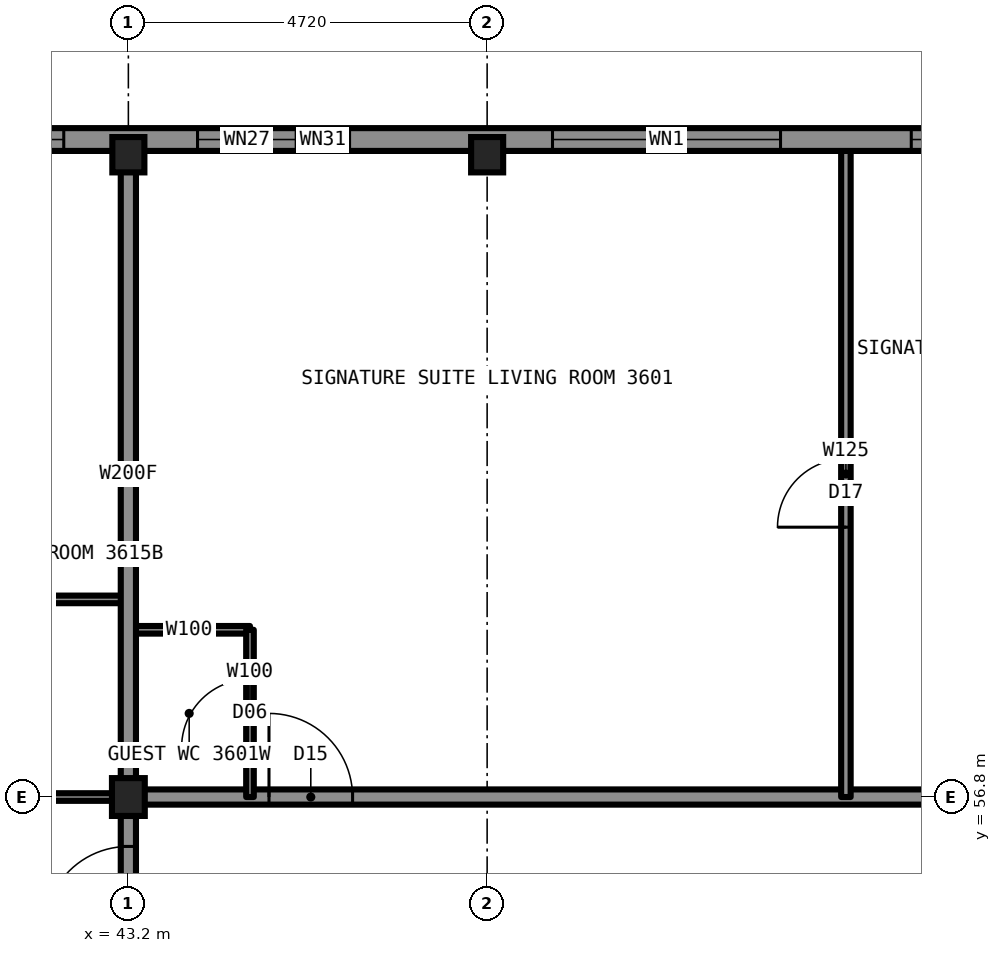
"""IFC4 building model, lengths in metres.
Left out: names, types, materials, properties, quantities, classifications, styles, units other than length and angle.
Written with IfcOpenShell. Run it as: python <this file> out.ifc"""

import sys

from ifc_helpers import new_model, si_unit, direction, frame, frame_2d, origin, origin_2d, place, context, subcontext, project, spatial, rectangle, i_section, extrude, element, fill, save


model = new_model("IFC4")
c1 = context("Model", 3, precision=1e-05, world=origin(), true_north=direction((0.0, 1.0)))
c2 = subcontext(c1, "Body", "Model", "MODEL_VIEW")
j1 = project(units=[si_unit("LENGTHUNIT", "METRE"), si_unit("PLANEANGLEUNIT", "RADIAN")], contexts=[c1])
p1 = place(None, origin())
s1 = spatial("IfcSite", under=j1, at=p1, CompositionType="ELEMENT")
p2 = place(p1, origin())
s2 = spatial("IfcBuilding", under=s1, at=p2, CompositionType="ELEMENT")
p3 = place(p2, frame((0.0, 0.0, 135.4)))
s3 = spatial("IfcBuildingStorey", under=s2, at=p3, CompositionType="ELEMENT", Elevation=135.4)
for number, where, z_axis, x_axis in (
    (1, (43.2, 65.25, 0.0), (0.0, 0.0, 1.0), (1.0, 0.0, 0.0)),
    (2, (47.92, 65.25, 0.0), (0.0, 0.0, 1.0), (1.0, 0.0, 0.0)),
):
    element("IfcColumn", number, at=place(p3, frame(where, z_axis=z_axis, x_axis=x_axis)), inside=s3, PredefinedType="COLUMN", context=c2, shape_type="SweptSolid", body=[
        extrude(i_section(OverallWidth=0.422, OverallDepth=0.465, WebThickness=0.045, FlangeThickness=0.073, at=origin_2d()), origin(), (0.0, 0.0, 1.0), 3.5),
    ])
p4 = place(p3, frame((43.2, 56.8, 0.0), z_axis=(0.0, 0.0, 1.0), x_axis=(1.0, 0.0, 0.0)))
e3 = element("IfcColumn", 3, at=p4, inside=s3, PredefinedType="COLUMN", context=c2, shape_type="SweptSolid", body=[
    extrude(i_section(OverallWidth=0.432, OverallDepth=0.498, WebThickness=0.056, FlangeThickness=0.089, at=origin_2d()), origin(), (0.0, 0.0, 1.0), 3.5),
])
p5 = place(p3, frame((40.6, 56.8, 0.0), z_axis=(0.0, 0.0, 1.0), x_axis=(1.0, 0.0, 0.0)))
e4 = element("IfcWall", 4, at=p5, inside=s3, PredefinedType="PARTITIONING", context=c2, shape_type="SweptSolid", body=[
    extrude(rectangle(XDim=2.6, YDim=0.1, at=frame_2d((1.3, 0.0))), origin(), (0.0, 0.0, 1.0), 2.573),
])
p6 = place(p3, frame((43.2, 56.8, 0.0), z_axis=(0.0, 0.0, 1.0), x_axis=(1.0, 0.0, 0.0)))
e5 = element("IfcWall", 5, at=p6, inside=s3, PredefinedType="PARTITIONING", context=c2, shape_type="SweptSolid", body=[
    extrude(rectangle(XDim=23.6, YDim=0.2, at=frame_2d((11.8, 0.0))), origin(), (0.0, 0.0, 1.0), 3.33),
])
p7 = place(p6, frame((1.85, 0.0, 0.0)))
e6 = element("IfcOpeningElement", 6, at=p7, cuts=e5, PredefinedType="OPENING", context=c2, shape_type="SweptSolid", body=[
    extrude(rectangle(XDim=1.1, YDim=2.2, at=frame_2d((0.55, 1.1))), frame((0.0, 0.11, 0.0), z_axis=(0.0, -1.0, 0.0), x_axis=(1.0, 0.0, 0.0)), (0.0, 0.0, 1.0), 0.22),
])
p8 = place(p6, frame((14.56, 0.0, 0.0)))
e7 = element("IfcOpeningElement", 7, at=p8, cuts=e5, PredefinedType="OPENING", context=c2, shape_type="SweptSolid", body=[
    extrude(rectangle(XDim=1.0, YDim=2.2, at=frame_2d((0.5, 1.1))), frame((0.0, 0.11, 0.0), z_axis=(0.0, -1.0, 0.0), x_axis=(1.0, 0.0, 0.0)), (0.0, 0.0, 1.0), 0.22),
])
p9 = place(p6, frame((21.14, 0.0, 0.0)))
e8 = element("IfcOpeningElement", 8, at=p9, cuts=e5, PredefinedType="OPENING", context=c2, shape_type="SweptSolid", body=[
    extrude(rectangle(XDim=1.0, YDim=2.2, at=frame_2d((0.5, 1.1))), frame((0.0, 0.11, 0.0), z_axis=(0.0, -1.0, 0.0), x_axis=(1.0, 0.0, 0.0)), (0.0, 0.0, 1.0), 0.22),
])
p10 = place(p3, frame((43.2, 59.0, 0.0), z_axis=(0.0, 0.0, 1.0), x_axis=(1.0, 0.0, 0.0)))
e9 = element("IfcWall", 9, at=p10, inside=s3, PredefinedType="PARTITIONING", context=c2, shape_type="SweptSolid", body=[
    extrude(rectangle(XDim=1.6, YDim=0.1, at=frame_2d((0.8, 0.0))), origin(), (0.0, 0.0, 1.0), 3.33),
])
p11 = place(p3, frame((40.6, 59.4, 0.0), z_axis=(0.0, 0.0, 1.0), x_axis=(1.0, 0.0, 0.0)))
e10 = element("IfcWall", 10, at=p11, inside=s3, PredefinedType="PARTITIONING", context=c2, shape_type="SweptSolid", body=[
    extrude(rectangle(XDim=2.6, YDim=0.1, at=frame_2d((1.3, 0.0))), origin(), (0.0, 0.0, 1.0), 3.33),
])
p12 = place(p3, frame((44.8, 56.8, 0.0), z_axis=(0.0, 0.0, 1.0), x_axis=(0.0, 1.0, 0.0)))
e11 = element("IfcWall", 11, at=p12, inside=s3, PredefinedType="PARTITIONING", context=c2, shape_type="SweptSolid", body=[
    extrude(rectangle(XDim=2.2, YDim=0.1, at=frame_2d((1.1, 0.0))), origin(), (0.0, 0.0, 1.0), 3.33),
])
p13 = place(p12, frame((0.65, 0.0, 0.0)))
e12 = element("IfcOpeningElement", 12, at=p13, cuts=e11, PredefinedType="OPENING", context=c2, shape_type="SweptSolid", body=[
    extrude(rectangle(XDim=0.9, YDim=2.1, at=frame_2d((0.45, 1.05))), frame((0.0, 0.06, 0.0), z_axis=(0.0, -1.0, 0.0), x_axis=(1.0, 0.0, 0.0)), (0.0, 0.0, 1.0), 0.12),
])
p14 = place(p3, frame((43.2, 33.2, 0.0), z_axis=(0.0, 0.0, 1.0), x_axis=(0.0, 1.0, 0.0)))
e13 = element("IfcWall", 13, at=p14, inside=s3, PredefinedType="PARTITIONING", context=c2, shape_type="SweptSolid", body=[
    extrude(rectangle(XDim=23.6, YDim=0.2, at=frame_2d((11.8, 0.0))), origin(), (0.0, 0.0, 1.0), 3.33),
])
p15 = place(p14, frame((6.98, 0.0, 0.0)))
e14 = element("IfcOpeningElement", 14, at=p15, cuts=e13, PredefinedType="OPENING", context=c2, shape_type="SweptSolid", body=[
    extrude(rectangle(XDim=1.0, YDim=2.2, at=frame_2d((0.5, 1.1))), frame((0.0, 0.11, 0.0), z_axis=(0.0, -1.0, 0.0), x_axis=(1.0, 0.0, 0.0)), (0.0, 0.0, 1.0), 0.22),
])
p16 = place(p14, frame((11.7, 0.0, 0.0)))
e15 = element("IfcOpeningElement", 15, at=p16, cuts=e13, PredefinedType="OPENING", context=c2, shape_type="SweptSolid", body=[
    extrude(rectangle(XDim=1.0, YDim=2.2, at=frame_2d((0.5, 1.1))), frame((0.0, 0.11, 0.0), z_axis=(0.0, -1.0, 0.0), x_axis=(1.0, 0.0, 0.0)), (0.0, 0.0, 1.0), 0.22),
])
p17 = place(p14, frame((15.62, 0.0, 0.0)))
e16 = element("IfcOpeningElement", 16, at=p17, cuts=e13, PredefinedType="OPENING", context=c2, shape_type="SweptSolid", body=[
    extrude(rectangle(XDim=1.0, YDim=2.2, at=frame_2d((0.5, 1.1))), frame((0.0, 0.11, 0.0), z_axis=(0.0, -1.0, 0.0), x_axis=(1.0, 0.0, 0.0)), (0.0, 0.0, 1.0), 0.22),
])
p18 = place(p14, frame((21.85, 0.0, 0.0)))
e17 = element("IfcOpeningElement", 17, at=p18, cuts=e13, PredefinedType="OPENING", context=c2, shape_type="SweptSolid", body=[
    extrude(rectangle(XDim=1.1, YDim=2.2, at=frame_2d((0.55, 1.1))), frame((0.0, 0.11, 0.0), z_axis=(0.0, -1.0, 0.0), x_axis=(1.0, 0.0, 0.0)), (0.0, 0.0, 1.0), 0.22),
])
p19 = place(p14, frame((0.65, 0.0, 0.0)))
e18 = element("IfcOpeningElement", 18, at=p19, cuts=e13, PredefinedType="OPENING", context=c2, shape_type="SweptSolid", body=[
    extrude(rectangle(XDim=1.1, YDim=2.2, at=frame_2d((0.55, 1.1))), frame((0.0, 0.11, 0.0), z_axis=(0.0, -1.0, 0.0), x_axis=(1.0, 0.0, 0.0)), (0.0, 0.0, 1.0), 0.22),
])
p20 = place(p3, frame((43.2, 56.8, 0.0), z_axis=(0.0, 0.0, 1.0), x_axis=(0.0, 1.0, 0.0)))
e19 = element("IfcWall", 19, at=p20, inside=s3, PredefinedType="PARTITIONING", context=c2, shape_type="SweptSolid", body=[
    extrude(rectangle(XDim=8.5, YDim=0.2, at=frame_2d((4.25, 0.0))), origin(), (0.0, 0.0, 1.0), 2.573),
])
p21 = place(p3, frame((52.64, 56.8, 0.0), z_axis=(0.0, 0.0, 1.0), x_axis=(0.0, 1.0, 0.0)))
e20 = element("IfcWall", 20, at=p21, inside=s3, PredefinedType="PARTITIONING", context=c2, shape_type="SweptSolid", body=[
    extrude(rectangle(XDim=8.5, YDim=0.125, at=frame_2d((4.25, 0.0))), origin(), (0.0, 0.0, 1.0), 3.33),
])
p22 = place(p21, frame((3.55, 0.0, 0.0)))
e21 = element("IfcOpeningElement", 21, at=p22, cuts=e20, PredefinedType="OPENING", context=c2, shape_type="SweptSolid", body=[
    extrude(rectangle(XDim=0.9, YDim=2.2, at=frame_2d((0.45, 1.1))), frame((0.0, 0.073, 0.0), z_axis=(0.0, -1.0, 0.0), x_axis=(1.0, 0.0, 0.0)), (0.0, 0.0, 1.0), 0.145),
])
p23 = place(p3, frame((70.1, 65.45, 0.0), z_axis=(0.0, 0.0, 1.0), x_axis=(-1.0, 0.0, 0.0)))
e22 = element("IfcWall", 22, at=p23, inside=s3, PredefinedType="SOLIDWALL", context=c2, shape_type="SweptSolid", body=[
    extrude(rectangle(XDim=30.2, YDim=0.3, at=frame_2d((15.1, 0.0))), origin(), (0.0, 0.0, 1.0), 2.83),
])
p24 = place(p23, frame((0.85, 0.0, 0.5)))
e23 = element("IfcOpeningElement", 23, at=p24, cuts=e22, PredefinedType="OPENING", context=c2, shape_type="SweptSolid", body=[
    extrude(rectangle(XDim=1.6, YDim=2.0, at=frame_2d((0.8, 1.0))), frame((0.0, 0.16, 0.0), z_axis=(0.0, -1.0, 0.0), x_axis=(1.0, 0.0, 0.0)), (0.0, 0.0, 1.0), 0.32),
])
p25 = place(p23, frame((4.16, 0.0, 0.5)))
e24 = element("IfcOpeningElement", 24, at=p25, cuts=e22, PredefinedType="OPENING", context=c2, shape_type="SweptSolid", body=[
    extrude(rectangle(XDim=1.3, YDim=1.9, at=frame_2d((0.65, 0.95))), frame((0.0, 0.16, 0.0), z_axis=(0.0, -1.0, 0.0), x_axis=(1.0, 0.0, 0.0)), (0.0, 0.0, 1.0), 0.32),
])
p26 = place(p23, frame((8.88, 0.0, 0.5)))
e25 = element("IfcOpeningElement", 25, at=p26, cuts=e22, PredefinedType="OPENING", context=c2, shape_type="SweptSolid", body=[
    extrude(rectangle(XDim=3.0, YDim=2.0, at=frame_2d((1.5, 1.0))), frame((0.0, 0.16, 0.0), z_axis=(0.0, -1.0, 0.0), x_axis=(1.0, 0.0, 0.0)), (0.0, 0.0, 1.0), 0.32),
])
p27 = place(p23, frame((13.6, 0.0, 0.5)))
e26 = element("IfcOpeningElement", 26, at=p27, cuts=e22, PredefinedType="OPENING", context=c2, shape_type="SweptSolid", body=[
    extrude(rectangle(XDim=3.0, YDim=2.0, at=frame_2d((1.5, 1.0))), frame((0.0, 0.16, 0.0), z_axis=(0.0, -1.0, 0.0), x_axis=(1.0, 0.0, 0.0)), (0.0, 0.0, 1.0), 0.32),
])
p28 = place(p23, frame((18.32, 0.0, 0.5)))
e27 = element("IfcOpeningElement", 27, at=p28, cuts=e22, PredefinedType="OPENING", context=c2, shape_type="SweptSolid", body=[
    extrude(rectangle(XDim=3.0, YDim=2.0, at=frame_2d((1.5, 1.0))), frame((0.0, 0.16, 0.0), z_axis=(0.0, -1.0, 0.0), x_axis=(1.0, 0.0, 0.0)), (0.0, 0.0, 1.0), 0.32),
])
p29 = place(p23, frame((24.69, 0.0, 0.5)))
e28 = element("IfcOpeningElement", 28, at=p29, cuts=e22, PredefinedType="OPENING", context=c2, shape_type="SweptSolid", body=[
    extrude(rectangle(XDim=1.3, YDim=1.9, at=frame_2d((0.65, 0.95))), frame((0.0, 0.16, 0.0), z_axis=(0.0, -1.0, 0.0), x_axis=(1.0, 0.0, 0.0)), (0.0, 0.0, 1.0), 0.32),
])
p30 = place(p23, frame((27.75, 0.0, 0.5)))
e29 = element("IfcOpeningElement", 29, at=p30, cuts=e22, PredefinedType="OPENING", context=c2, shape_type="SweptSolid", body=[
    extrude(rectangle(XDim=1.6, YDim=2.0, at=frame_2d((0.8, 1.0))), frame((0.0, 0.16, 0.0), z_axis=(0.0, -1.0, 0.0), x_axis=(1.0, 0.0, 0.0)), (0.0, 0.0, 1.0), 0.32),
])
p31 = place(p23, frame((5.51, 0.0, 0.5)))
e30 = element("IfcOpeningElement", 30, at=p31, cuts=e22, PredefinedType="OPENING", context=c2, shape_type="SweptSolid", body=[
    extrude(rectangle(XDim=0.7, YDim=0.9, at=frame_2d((0.35, 0.45))), frame((0.0, 0.16, 0.0), z_axis=(0.0, -1.0, 0.0), x_axis=(1.0, 0.0, 0.0)), (0.0, 0.0, 1.0), 0.32),
])
p32 = place(p23, frame((23.99, 0.0, 0.5)))
e31 = element("IfcOpeningElement", 31, at=p32, cuts=e22, PredefinedType="OPENING", context=c2, shape_type="SweptSolid", body=[
    extrude(rectangle(XDim=0.7, YDim=0.9, at=frame_2d((0.35, 0.45))), frame((0.0, 0.16, 0.0), z_axis=(0.0, -1.0, 0.0), x_axis=(1.0, 0.0, 0.0)), (0.0, 0.0, 1.0), 0.32),
])
p33 = place(p7, origin())
e32 = element("IfcDoor", 32, at=p33, inside=s3, OperationType="SINGLE_SWING_LEFT", PredefinedType="DOOR", context=c2, shape_type="SweptSolid", body=[
    extrude(rectangle(XDim=1.1, YDim=2.2, at=frame_2d((0.55, 1.1))), frame((0.0, 0.025, 0.0), z_axis=(0.0, -1.0, 0.0), x_axis=(1.0, 0.0, 0.0)), (0.0, 0.0, 1.0), 0.05),
])
fill(e6, e32)
p34 = place(p22, origin())
e33 = element("IfcDoor", 33, at=p34, inside=s3, OperationType="SINGLE_SWING_LEFT", PredefinedType="DOOR", context=c2, shape_type="SweptSolid", body=[
    extrude(rectangle(XDim=0.9, YDim=2.2, at=frame_2d((0.45, 1.1))), frame((0.0, 0.025, 0.0), z_axis=(0.0, -1.0, 0.0), x_axis=(1.0, 0.0, 0.0)), (0.0, 0.0, 1.0), 0.05),
])
fill(e21, e33)
p35 = place(p13, origin())
e34 = element("IfcDoor", 34, at=p35, inside=s3, OperationType="SINGLE_SWING_LEFT", PredefinedType="DOOR", context=c2, shape_type="SweptSolid", body=[
    extrude(rectangle(XDim=0.9, YDim=2.1, at=frame_2d((0.45, 1.05))), frame((0.0, 0.025, 0.0), z_axis=(0.0, -1.0, 0.0), x_axis=(1.0, 0.0, 0.0)), (0.0, 0.0, 1.0), 0.05),
])
fill(e12, e34)
p36 = place(p18, origin())
e35 = element("IfcDoor", 35, at=p36, inside=s3, OperationType="SINGLE_SWING_LEFT", PredefinedType="DOOR", context=c2, shape_type="SweptSolid", body=[
    extrude(rectangle(XDim=1.1, YDim=2.2, at=frame_2d((0.55, 1.1))), frame((0.0, 0.025, 0.0), z_axis=(0.0, -1.0, 0.0), x_axis=(1.0, 0.0, 0.0)), (0.0, 0.0, 1.0), 0.05),
])
fill(e17, e35)
p37 = place(p27, origin())
e36 = element("IfcWindow", 36, at=p37, inside=s3, PartitioningType="SINGLE_PANEL", PredefinedType="WINDOW", context=c2, shape_type="SweptSolid", body=[
    extrude(rectangle(XDim=3.0, YDim=2.0, at=frame_2d((1.5, 1.0))), frame((0.0, 0.03, 0.0), z_axis=(0.0, -1.0, 0.0), x_axis=(1.0, 0.0, 0.0)), (0.0, 0.0, 1.0), 0.06),
])
fill(e26, e36)
p38 = place(p28, origin())
e37 = element("IfcWindow", 37, at=p38, inside=s3, PartitioningType="SINGLE_PANEL", PredefinedType="WINDOW", context=c2, shape_type="SweptSolid", body=[
    extrude(rectangle(XDim=3.0, YDim=2.0, at=frame_2d((1.5, 1.0))), frame((0.0, 0.03, 0.0), z_axis=(0.0, -1.0, 0.0), x_axis=(1.0, 0.0, 0.0)), (0.0, 0.0, 1.0), 0.06),
])
fill(e27, e37)
p39 = place(p29, origin())
e38 = element("IfcWindow", 38, at=p39, inside=s3, PartitioningType="SINGLE_PANEL", PredefinedType="WINDOW", context=c2, shape_type="SweptSolid", body=[
    extrude(rectangle(XDim=1.3, YDim=1.9, at=frame_2d((0.65, 0.95))), frame((0.0, 0.03, 0.0), z_axis=(0.0, -1.0, 0.0), x_axis=(1.0, 0.0, 0.0)), (0.0, 0.0, 1.0), 0.06),
])
fill(e28, e38)
p40 = place(p30, origin())
e39 = element("IfcWindow", 39, at=p40, inside=s3, PartitioningType="SINGLE_PANEL", PredefinedType="WINDOW", context=c2, shape_type="SweptSolid", body=[
    extrude(rectangle(XDim=1.6, YDim=2.0, at=frame_2d((0.8, 1.0))), frame((0.0, 0.03, 0.0), z_axis=(0.0, -1.0, 0.0), x_axis=(1.0, 0.0, 0.0)), (0.0, 0.0, 1.0), 0.06),
])
fill(e29, e39)
p41 = place(p32, origin())
e40 = element("IfcWindow", 40, at=p41, inside=s3, PartitioningType="SINGLE_PANEL", PredefinedType="WINDOW", context=c2, shape_type="SweptSolid", body=[
    extrude(rectangle(XDim=0.7, YDim=0.9, at=frame_2d((0.35, 0.45))), frame((0.0, 0.03, 0.0), z_axis=(0.0, -1.0, 0.0), x_axis=(1.0, 0.0, 0.0)), (0.0, 0.0, 1.0), 0.06),
])
fill(e31, e40)
save(model, sys.argv[1])
